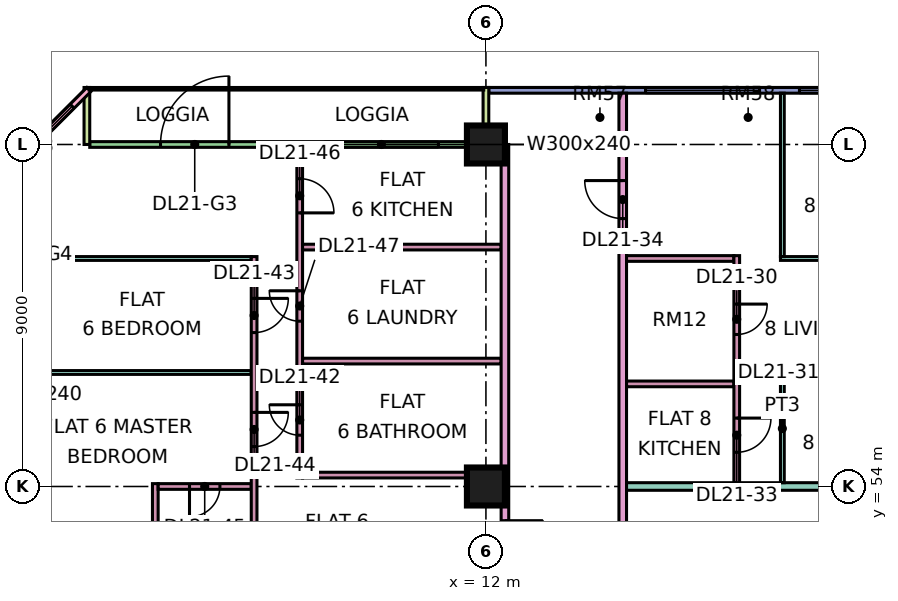
"""IFC4 building model, lengths in metres.
Left out: names, types, materials, properties, quantities, classifications, styles, units other than length and angle.
Written with IfcOpenShell. Run it as: python <this file> out.ifc"""

import sys

from ifc_helpers import new_model, si_unit, direction, frame, frame_2d, origin, origin_2d, place, context, subcontext, project, spatial, rectangle, extrude, element, fill, save


model = new_model("IFC4")
c1 = context("Model", 3, precision=1e-05, world=origin(), true_north=direction((0.0, 1.0)))
c2 = subcontext(c1, "Body", "Model", "MODEL_VIEW")
j1 = project(units=[si_unit("LENGTHUNIT", "METRE"), si_unit("PLANEANGLEUNIT", "RADIAN")], contexts=[c1])
p1 = place(None, origin())
s1 = spatial("IfcSite", under=j1, at=p1, CompositionType="ELEMENT")
p2 = place(p1, origin())
s2 = spatial("IfcBuilding", under=s1, at=p2, CompositionType="ELEMENT")
p3 = place(p2, frame((0.0, 0.0, 95.65)))
s3 = spatial("IfcBuildingStorey", under=s2, at=p3, CompositionType="ELEMENT", Elevation=95.65)
for number, where, z_axis, x_axis in (
    (1, (12.0, 54.0, 0.0), (0.0, 0.0, 1.0), (1.0, 0.0, 0.0)),
    (2, (12.0, 63.0, 0.0), (0.0, 0.0, 1.0), (1.0, 0.0, 0.0)),
):
    element("IfcColumn", number, at=place(p3, frame(where, z_axis=z_axis, x_axis=x_axis)), inside=s3, PredefinedType="COLUMN", context=c2, shape_type="SweptSolid", body=[
        extrude(rectangle(XDim=1.0, YDim=1.0, at=origin_2d()), origin(), (0.0, 0.0, 1.0), 3.75),
    ])
p4 = place(p3, frame((22.5, 64.425, 0.0), z_axis=(0.0, 0.0, 1.0), x_axis=(-1.0, 0.0, 0.0)))
e3 = element("IfcWall", 3, at=p4, inside=s3, PredefinedType="SOLIDWALL", context=c2, shape_type="SweptSolid", body=[
    extrude(rectangle(XDim=10.425, YDim=0.15, at=frame_2d((5.212, 0.0))), origin(), (0.0, 0.0, 1.0), 3.35),
])
p5 = place(p4, frame((0.45, 0.0, 0.45)))
e4 = element("IfcOpeningElement", 4, at=p5, cuts=e3, PredefinedType="OPENING", context=c2, shape_type="SweptSolid", body=[
    extrude(rectangle(XDim=1.8, YDim=2.4, at=frame_2d((0.9, 1.2))), frame((0.0, 0.085, 0.0), z_axis=(0.0, -1.0, 0.0), x_axis=(1.0, 0.0, 0.0)), (0.0, 0.0, 1.0), 0.17),
])
p6 = place(p4, frame((3.3, 0.0, 0.45)))
e5 = element("IfcOpeningElement", 5, at=p6, cuts=e3, PredefinedType="OPENING", context=c2, shape_type="SweptSolid", body=[
    extrude(rectangle(XDim=3.0, YDim=2.4, at=frame_2d((1.5, 1.2))), frame((0.0, 0.085, 0.0), z_axis=(0.0, -1.0, 0.0), x_axis=(1.0, 0.0, 0.0)), (0.0, 0.0, 1.0), 0.17),
])
p7 = place(p3, frame((11.925, 63.0, 0.0), z_axis=(0.0, 0.0, 1.0), x_axis=(-1.0, 0.0, 0.0)))
e6 = element("IfcWall", 6, at=p7, inside=s3, PredefinedType="SOLIDWALL", context=c2, shape_type="SweptSolid", body=[
    extrude(rectangle(XDim=10.35, YDim=0.15, at=frame_2d((5.175, 0.0))), origin(), (0.0, 0.0, 1.0), 3.35),
])
p8 = place(p7, frame((1.175, 0.0, 0.45)))
e7 = element("IfcOpeningElement", 7, at=p8, cuts=e6, PredefinedType="OPENING", context=c2, shape_type="SweptSolid", body=[
    extrude(rectangle(XDim=3.0, YDim=2.4, at=frame_2d((1.5, 1.2))), frame((0.0, 0.085, 0.0), z_axis=(0.0, -1.0, 0.0), x_axis=(1.0, 0.0, 0.0)), (0.0, 0.0, 1.0), 0.17),
])
p9 = place(p7, frame((6.688, 0.0, 0.0)))
e8 = element("IfcOpeningElement", 8, at=p9, cuts=e6, PredefinedType="OPENING", context=c2, shape_type="SweptSolid", body=[
    extrude(rectangle(XDim=1.8, YDim=2.4, at=frame_2d((0.9, 1.2))), frame((0.0, 0.085, 0.0), z_axis=(0.0, -1.0, 0.0), x_axis=(1.0, 0.0, 0.0)), (0.0, 0.0, 1.0), 0.17),
])
for number, where, z_axis, x_axis in (
    (9, (12.0, 64.5, 0.0), (0.0, 0.0, 1.0), (0.0, -1.0, 0.0)),
    (10, (1.5, 64.5, 0.0), (0.0, 0.0, 1.0), (0.0, -1.0, 0.0)),
):
    element("IfcWall", number, at=place(p3, frame(where, z_axis=z_axis, x_axis=x_axis)), inside=s3, PredefinedType="SOLIDWALL", context=c2, shape_type="SweptSolid", body=[
        extrude(rectangle(XDim=1.5, YDim=0.15, at=frame_2d((0.75, 0.0))), origin(), (0.0, 0.0, 1.0), 3.35),
    ])
p10 = place(p3, frame((1.553, 64.447, 0.0), z_axis=(0.0, 0.0, 1.0), x_axis=(-0.707106781187, -0.707106781187, 0.0)))
e11 = element("IfcWall", 11, at=p10, inside=s3, PredefinedType="SOLIDWALL", context=c2, shape_type="SweptSolid", body=[
    extrude(rectangle(XDim=4.243, YDim=0.15, at=frame_2d((2.121, 0.0))), origin(), (0.0, 0.0, 1.0), 3.35),
])
p11 = place(p10, frame((0.621, 0.0, 0.45)))
e12 = element("IfcOpeningElement", 12, at=p11, cuts=e11, PredefinedType="OPENING", context=c2, shape_type="SweptSolid", body=[
    extrude(rectangle(XDim=3.0, YDim=2.4, at=frame_2d((1.5, 1.2))), frame((0.0, 0.085, 0.0), z_axis=(0.0, -1.0, 0.0), x_axis=(1.0, 0.0, 0.0)), (0.0, 0.0, 1.0), 0.17),
])
for number, where, z_axis, x_axis in (
    (13, (0.074, 57.0, 0.0), (0.0, 0.0, 1.0), (1.0, 0.0, 0.0)),
    (14, (0.074, 60.0, 0.0), (0.0, 0.0, 1.0), (1.0, 0.0, 0.0)),
):
    element("IfcWall", number, at=place(p3, frame(where, z_axis=z_axis, x_axis=x_axis)), inside=s3, PredefinedType="PARTITIONING", context=c2, shape_type="SweptSolid", body=[
        extrude(rectangle(XDim=5.751, YDim=0.1, at=frame_2d((2.875, 0.0))), origin(), (0.0, 0.0, 1.0), 3.35),
    ])
p12 = place(p3, frame((3.3, 51.1, 0.0), z_axis=(0.0, 0.0, 1.0), x_axis=(0.0, 1.0, 0.0)))
e15 = element("IfcWall", 15, at=p12, inside=s3, PredefinedType="PARTITIONING", context=c2, shape_type="SweptSolid", body=[
    extrude(rectangle(XDim=2.975, YDim=0.15, at=frame_2d((1.487, 0.0))), origin(), (0.0, 0.0, 1.0), 3.35),
])
p13 = place(p3, frame((3.375, 54.0, 0.0), z_axis=(0.0, 0.0, 1.0), x_axis=(1.0, 0.0, 0.0)))
e16 = element("IfcWall", 16, at=p13, inside=s3, PredefinedType="PARTITIONING", context=c2, shape_type="SweptSolid", body=[
    extrude(rectangle(XDim=2.45, YDim=0.15, at=frame_2d((1.225, 0.0))), origin(), (0.0, 0.0, 1.0), 3.35),
])
p14 = place(p13, frame((0.825, 0.0, 0.0)))
e17 = element("IfcOpeningElement", 17, at=p14, cuts=e16, PredefinedType="OPENING", context=c2, shape_type="SweptSolid", body=[
    extrude(rectangle(XDim=0.8, YDim=2.1, at=frame_2d((0.4, 1.05))), frame((0.0, 0.085, 0.0), z_axis=(0.0, -1.0, 0.0), x_axis=(1.0, 0.0, 0.0)), (0.0, 0.0, 1.0), 0.17),
])
p15 = place(p3, frame((5.9, 51.1, 0.0), z_axis=(0.0, 0.0, 1.0), x_axis=(0.0, 1.0, 0.0)))
e18 = element("IfcWall", 18, at=p15, inside=s3, PredefinedType="PARTITIONING", context=c2, shape_type="SweptSolid", body=[
    extrude(rectangle(XDim=8.95, YDim=0.15, at=frame_2d((4.475, 0.0))), origin(), (0.0, 0.0, 1.0), 3.35),
])
p16 = place(p15, frame((6.95, 0.0, 0.0)))
e19 = element("IfcOpeningElement", 19, at=p16, cuts=e18, PredefinedType="OPENING", context=c2, shape_type="SweptSolid", body=[
    extrude(rectangle(XDim=0.9, YDim=2.1, at=frame_2d((0.45, 1.05))), frame((0.0, 0.085, 0.0), z_axis=(0.0, -1.0, 0.0), x_axis=(1.0, 0.0, 0.0)), (0.0, 0.0, 1.0), 0.17),
])
p17 = place(p15, frame((3.95, 0.0, 0.0)))
e20 = element("IfcOpeningElement", 20, at=p17, cuts=e18, PredefinedType="OPENING", context=c2, shape_type="SweptSolid", body=[
    extrude(rectangle(XDim=0.9, YDim=2.1, at=frame_2d((0.45, 1.05))), frame((0.0, 0.085, 0.0), z_axis=(0.0, -1.0, 0.0), x_axis=(1.0, 0.0, 0.0)), (0.0, 0.0, 1.0), 0.17),
])
p18 = place(p3, frame((7.1, 54.225, 0.0), z_axis=(0.0, 0.0, 1.0), x_axis=(0.0, 1.0, 0.0)))
e21 = element("IfcWall", 21, at=p18, inside=s3, PredefinedType="PARTITIONING", context=c2, shape_type="SweptSolid", body=[
    extrude(rectangle(XDim=8.701, YDim=0.15, at=frame_2d((4.351, 0.0))), origin(), (0.0, 0.0, 1.0), 3.35),
])
p19 = place(p18, frame((1.125, 0.0, 0.0)))
e22 = element("IfcOpeningElement", 22, at=p19, cuts=e21, PredefinedType="OPENING", context=c2, shape_type="SweptSolid", body=[
    extrude(rectangle(XDim=0.8, YDim=2.1, at=frame_2d((0.4, 1.05))), frame((0.0, 0.085, 0.0), z_axis=(0.0, -1.0, 0.0), x_axis=(1.0, 0.0, 0.0)), (0.0, 0.0, 1.0), 0.17),
])
p20 = place(p18, frame((6.975, 0.0, 0.0)))
e23 = element("IfcOpeningElement", 23, at=p20, cuts=e21, PredefinedType="OPENING", context=c2, shape_type="SweptSolid", body=[
    extrude(rectangle(XDim=0.9, YDim=2.1, at=frame_2d((0.45, 1.05))), frame((0.0, 0.085, 0.0), z_axis=(0.0, -1.0, 0.0), x_axis=(1.0, 0.0, 0.0)), (0.0, 0.0, 1.0), 0.17),
])
p21 = place(p18, frame((4.125, 0.0, 0.0)))
e24 = element("IfcOpeningElement", 24, at=p21, cuts=e21, PredefinedType="OPENING", context=c2, shape_type="SweptSolid", body=[
    extrude(rectangle(XDim=0.8, YDim=2.1, at=frame_2d((0.4, 1.05))), frame((0.0, 0.085, 0.0), z_axis=(0.0, -1.0, 0.0), x_axis=(1.0, 0.0, 0.0)), (0.0, 0.0, 1.0), 0.17),
])
for number, where, z_axis, x_axis in (
    (25, (7.175, 54.3, 0.0), (0.0, 0.0, 1.0), (1.0, 0.0, 0.0)),
    (26, (7.175, 57.3, 0.0), (0.0, 0.0, 1.0), (1.0, 0.0, 0.0)),
    (27, (7.175, 60.3, 0.0), (0.0, 0.0, 1.0), (1.0, 0.0, 0.0)),
):
    element("IfcWall", number, at=place(p3, frame(where, z_axis=z_axis, x_axis=x_axis)), inside=s3, PredefinedType="PARTITIONING", context=c2, shape_type="SweptSolid", body=[
        extrude(rectangle(XDim=5.225, YDim=0.15, at=frame_2d((2.612, 0.0))), origin(), (0.0, 0.0, 1.0), 3.35),
    ])
p22 = place(p3, frame((12.5, 20.0, 0.0), z_axis=(0.0, 0.0, 1.0), x_axis=(0.0, 1.0, 0.0)))
e28 = element("IfcWall", 28, at=p22, inside=s3, PredefinedType="PARTITIONING", context=c2, shape_type="SweptSolid", body=[
    extrude(rectangle(XDim=43.0, YDim=0.2, at=frame_2d((21.5, 0.0))), origin(), (0.0, 0.0, 1.0), 3.35),
])
p23 = place(p22, frame((28.65, 0.0, 0.0)))
e29 = element("IfcOpeningElement", 29, at=p23, cuts=e28, PredefinedType="OPENING", context=c2, shape_type="SweptSolid", body=[
    extrude(rectangle(XDim=1.0, YDim=2.1, at=frame_2d((0.5, 1.05))), frame((0.0, 0.11, 0.0), z_axis=(0.0, -1.0, 0.0), x_axis=(1.0, 0.0, 0.0)), (0.0, 0.0, 1.0), 0.22),
])
p24 = place(p22, frame((32.1, 0.0, 0.0)))
e30 = element("IfcOpeningElement", 30, at=p24, cuts=e28, PredefinedType="OPENING", context=c2, shape_type="SweptSolid", body=[
    extrude(rectangle(XDim=1.0, YDim=2.1, at=frame_2d((0.5, 1.05))), frame((0.0, 0.11, 0.0), z_axis=(0.0, -1.0, 0.0), x_axis=(1.0, 0.0, 0.0)), (0.0, 0.0, 1.0), 0.22),
])
p25 = place(p22, frame((0.6, 0.0, 0.0)))
e31 = element("IfcOpeningElement", 31, at=p25, cuts=e28, PredefinedType="OPENING", context=c2, shape_type="SweptSolid", body=[
    extrude(rectangle(XDim=1.2, YDim=2.1, at=frame_2d((0.6, 1.05))), frame((0.0, 0.11, 0.0), z_axis=(0.0, -1.0, 0.0), x_axis=(1.0, 0.0, 0.0)), (0.0, 0.0, 1.0), 0.22),
])
p26 = place(p22, frame((11.1, 0.0, 0.0)))
e32 = element("IfcOpeningElement", 32, at=p26, cuts=e28, PredefinedType="OPENING", context=c2, shape_type="SweptSolid", body=[
    extrude(rectangle(XDim=1.0, YDim=2.1, at=frame_2d((0.5, 1.05))), frame((0.0, 0.11, 0.0), z_axis=(0.0, -1.0, 0.0), x_axis=(1.0, 0.0, 0.0)), (0.0, 0.0, 1.0), 0.22),
])
p27 = place(p3, frame((15.6, 51.225, 0.0), z_axis=(0.0, 0.0, 1.0), x_axis=(0.0, 1.0, 0.0)))
e33 = element("IfcWall", 33, at=p27, inside=s3, PredefinedType="PARTITIONING", context=c2, shape_type="SweptSolid", body=[
    extrude(rectangle(XDim=13.125, YDim=0.2, at=frame_2d((6.562, 0.0))), origin(), (0.0, 0.0, 1.0), 3.35),
])
p28 = place(p27, frame((9.825, 0.0, 0.0)))
e34 = element("IfcOpeningElement", 34, at=p28, cuts=e33, PredefinedType="OPENING", context=c2, shape_type="SweptSolid", body=[
    extrude(rectangle(XDim=1.0, YDim=2.1, at=frame_2d((0.5, 1.05))), frame((0.0, 0.11, 0.0), z_axis=(0.0, -1.0, 0.0), x_axis=(1.0, 0.0, 0.0)), (0.0, 0.0, 1.0), 0.22),
])
p29 = place(p3, frame((15.7, 54.0, 0.0), z_axis=(0.0, 0.0, 1.0), x_axis=(1.0, 0.0, 0.0)))
e35 = element("IfcWall", 35, at=p29, inside=s3, PredefinedType="PARTITIONING", context=c2, shape_type="SweptSolid", body=[
    extrude(rectangle(XDim=8.226, YDim=0.2, at=frame_2d((4.113, 0.0))), origin(), (0.0, 0.0, 1.0), 3.35),
])
for number, where, z_axis, x_axis in (
    (36, (15.7, 56.7, 0.0), (0.0, 0.0, 1.0), (1.0, 0.0, 0.0)),
    (37, (15.7, 60.0, 0.0), (0.0, 0.0, 1.0), (1.0, 0.0, 0.0)),
):
    element("IfcWall", number, at=place(p3, frame(where, z_axis=z_axis, x_axis=x_axis)), inside=s3, PredefinedType="PARTITIONING", context=c2, shape_type="SweptSolid", body=[
        extrude(rectangle(XDim=2.825, YDim=0.15, at=frame_2d((1.413, 0.0))), origin(), (0.0, 0.0, 1.0), 3.35),
    ])
p30 = place(p3, frame((18.6, 54.1, 0.0), z_axis=(0.0, 0.0, 1.0), x_axis=(0.0, 1.0, 0.0)))
e38 = element("IfcWall", 38, at=p30, inside=s3, PredefinedType="PARTITIONING", context=c2, shape_type="SweptSolid", body=[
    extrude(rectangle(XDim=5.975, YDim=0.15, at=frame_2d((2.987, 0.0))), origin(), (0.0, 0.0, 1.0), 3.35),
])
p31 = place(p30, frame((3.9, 0.0, 0.0)))
e39 = element("IfcOpeningElement", 39, at=p31, cuts=e38, PredefinedType="OPENING", context=c2, shape_type="SweptSolid", body=[
    extrude(rectangle(XDim=0.8, YDim=2.1, at=frame_2d((0.4, 1.05))), frame((0.0, 0.085, 0.0), z_axis=(0.0, -1.0, 0.0), x_axis=(1.0, 0.0, 0.0)), (0.0, 0.0, 1.0), 0.17),
])
p32 = place(p30, frame((0.8, 0.0, 0.0)))
e40 = element("IfcOpeningElement", 40, at=p32, cuts=e38, PredefinedType="OPENING", context=c2, shape_type="SweptSolid", body=[
    extrude(rectangle(XDim=0.9, YDim=2.1, at=frame_2d((0.45, 1.05))), frame((0.0, 0.085, 0.0), z_axis=(0.0, -1.0, 0.0), x_axis=(1.0, 0.0, 0.0)), (0.0, 0.0, 1.0), 0.17),
])
p33 = place(p3, frame((19.75, 57.0, 0.0), z_axis=(0.0, 0.0, 1.0), x_axis=(1.0, 0.0, 0.0)))
e41 = element("IfcWall", 41, at=p33, inside=s3, PredefinedType="PARTITIONING", context=c2, shape_type="SweptSolid", body=[
    extrude(rectangle(XDim=4.176, YDim=0.1, at=frame_2d((2.088, 0.0))), origin(), (0.0, 0.0, 1.0), 3.35),
])
p34 = place(p33, frame((1.7, 0.0, 0.0)))
e42 = element("IfcOpeningElement", 42, at=p34, cuts=e41, PredefinedType="OPENING", context=c2, shape_type="SweptSolid", body=[
    extrude(rectangle(XDim=0.9, YDim=2.1, at=frame_2d((0.45, 1.05))), frame((0.0, 0.06, 0.0), z_axis=(0.0, -1.0, 0.0), x_axis=(1.0, 0.0, 0.0)), (0.0, 0.0, 1.0), 0.12),
])
p35 = place(p3, frame((19.75, 60.0, 0.0), z_axis=(0.0, 0.0, 1.0), x_axis=(1.0, 0.0, 0.0)))
e43 = element("IfcWall", 43, at=p35, inside=s3, PredefinedType="PARTITIONING", context=c2, shape_type="SweptSolid", body=[
    extrude(rectangle(XDim=4.176, YDim=0.1, at=frame_2d((2.088, 0.0))), origin(), (0.0, 0.0, 1.0), 3.35),
])
p36 = place(p35, frame((1.7, 0.0, 0.0)))
e44 = element("IfcOpeningElement", 44, at=p36, cuts=e43, PredefinedType="OPENING", context=c2, shape_type="SweptSolid", body=[
    extrude(rectangle(XDim=0.9, YDim=2.1, at=frame_2d((0.45, 1.05))), frame((0.0, 0.06, 0.0), z_axis=(0.0, -1.0, 0.0), x_axis=(1.0, 0.0, 0.0)), (0.0, 0.0, 1.0), 0.12),
])
p37 = place(p3, frame((19.8, 54.1, 0.0), z_axis=(0.0, 0.0, 1.0), x_axis=(0.0, 1.0, 0.0)))
e45 = element("IfcWall", 45, at=p37, inside=s3, PredefinedType="PARTITIONING", context=c2, shape_type="SweptSolid", body=[
    extrude(rectangle(XDim=2.85, YDim=0.1, at=frame_2d((1.425, 0.0))), origin(), (0.0, 0.0, 1.0), 3.35),
])
p38 = place(p3, frame((19.8, 60.05, 0.0), z_axis=(0.0, 0.0, 1.0), x_axis=(0.0, 1.0, 0.0)))
e46 = element("IfcWall", 46, at=p38, inside=s3, PredefinedType="PARTITIONING", context=c2, shape_type="SweptSolid", body=[
    extrude(rectangle(XDim=4.3, YDim=0.1, at=frame_2d((2.15, 0.0))), origin(), (0.0, 0.0, 1.0), 3.35),
])
p39 = place(p5, origin())
e47 = element("IfcWindow", 47, at=p39, inside=s3, PartitioningType="SINGLE_PANEL", PredefinedType="WINDOW", context=c2, shape_type="SweptSolid", body=[
    extrude(rectangle(XDim=1.8, YDim=2.4, at=frame_2d((0.9, 1.2))), frame((0.0, 0.03, 0.0), z_axis=(0.0, -1.0, 0.0), x_axis=(1.0, 0.0, 0.0)), (0.0, 0.0, 1.0), 0.06),
])
fill(e4, e47)
p40 = place(p6, origin())
e48 = element("IfcWindow", 48, at=p40, inside=s3, PartitioningType="SINGLE_PANEL", PredefinedType="WINDOW", context=c2, shape_type="SweptSolid", body=[
    extrude(rectangle(XDim=3.0, YDim=2.4, at=frame_2d((1.5, 1.2))), frame((0.0, 0.03, 0.0), z_axis=(0.0, -1.0, 0.0), x_axis=(1.0, 0.0, 0.0)), (0.0, 0.0, 1.0), 0.06),
])
fill(e5, e48)
p41 = place(p8, origin())
e49 = element("IfcWindow", 49, at=p41, inside=s3, PartitioningType="SINGLE_PANEL", PredefinedType="WINDOW", context=c2, shape_type="SweptSolid", body=[
    extrude(rectangle(XDim=3.0, YDim=2.4, at=frame_2d((1.5, 1.2))), frame((0.0, 0.03, 0.0), z_axis=(0.0, -1.0, 0.0), x_axis=(1.0, 0.0, 0.0)), (0.0, 0.0, 1.0), 0.06),
])
fill(e7, e49)
p42 = place(p9, frame((1.8, 0.0, 0.0), z_axis=(0.0, 0.0, 1.0), x_axis=(-1.0, 0.0, 0.0)))
e50 = element("IfcDoor", 50, at=p42, inside=s3, OperationType="DOUBLE_DOOR_SINGLE_SWING", PredefinedType="DOOR", context=c2, shape_type="SweptSolid", body=[
    extrude(rectangle(XDim=1.8, YDim=2.4, at=frame_2d((0.9, 1.2))), frame((0.0, 0.025, 0.0), z_axis=(0.0, -1.0, 0.0), x_axis=(1.0, 0.0, 0.0)), (0.0, 0.0, 1.0), 0.05),
])
fill(e8, e50)
p43 = place(p11, origin())
e51 = element("IfcWindow", 51, at=p43, inside=s3, PartitioningType="SINGLE_PANEL", PredefinedType="WINDOW", context=c2, shape_type="SweptSolid", body=[
    extrude(rectangle(XDim=3.0, YDim=2.4, at=frame_2d((1.5, 1.2))), frame((0.0, 0.03, 0.0), z_axis=(0.0, -1.0, 0.0), x_axis=(1.0, 0.0, 0.0)), (0.0, 0.0, 1.0), 0.06),
])
fill(e12, e51)
p44 = place(p31, origin())
e52 = element("IfcDoor", 52, at=p44, inside=s3, OperationType="SINGLE_SWING_RIGHT", PredefinedType="DOOR", context=c2, shape_type="SweptSolid", body=[
    extrude(rectangle(XDim=0.8, YDim=2.1, at=frame_2d((0.4, 1.05))), frame((0.0, 0.025, 0.0), z_axis=(0.0, -1.0, 0.0), x_axis=(1.0, 0.0, 0.0)), (0.0, 0.0, 1.0), 0.05),
])
fill(e39, e52)
p45 = place(p32, origin())
e53 = element("IfcDoor", 53, at=p45, inside=s3, OperationType="SINGLE_SWING_RIGHT", PredefinedType="DOOR", context=c2, shape_type="SweptSolid", body=[
    extrude(rectangle(XDim=0.9, YDim=2.1, at=frame_2d((0.45, 1.05))), frame((0.0, 0.025, 0.0), z_axis=(0.0, -1.0, 0.0), x_axis=(1.0, 0.0, 0.0)), (0.0, 0.0, 1.0), 0.05),
])
fill(e40, e53)
p46 = place(p28, frame((1.0, 0.0, 0.0), z_axis=(0.0, 0.0, 1.0), x_axis=(-1.0, 0.0, 0.0)))
e54 = element("IfcDoor", 54, at=p46, inside=s3, OperationType="SINGLE_SWING_RIGHT", PredefinedType="DOOR", context=c2, shape_type="SweptSolid", body=[
    extrude(rectangle(XDim=1.0, YDim=2.1, at=frame_2d((0.5, 1.05))), frame((0.0, 0.025, 0.0), z_axis=(0.0, -1.0, 0.0), x_axis=(1.0, 0.0, 0.0)), (0.0, 0.0, 1.0), 0.05),
])
fill(e34, e54)
p47 = place(p19, frame((0.8, 0.0, 0.0), z_axis=(0.0, 0.0, 1.0), x_axis=(-1.0, 0.0, 0.0)))
e55 = element("IfcDoor", 55, at=p47, inside=s3, OperationType="SINGLE_SWING_RIGHT", PredefinedType="DOOR", context=c2, shape_type="SweptSolid", body=[
    extrude(rectangle(XDim=0.8, YDim=2.1, at=frame_2d((0.4, 1.05))), frame((0.0, 0.025, 0.0), z_axis=(0.0, -1.0, 0.0), x_axis=(1.0, 0.0, 0.0)), (0.0, 0.0, 1.0), 0.05),
])
fill(e22, e55)
p48 = place(p16, origin())
e56 = element("IfcDoor", 56, at=p48, inside=s3, OperationType="SINGLE_SWING_RIGHT", PredefinedType="DOOR", context=c2, shape_type="SweptSolid", body=[
    extrude(rectangle(XDim=0.9, YDim=2.1, at=frame_2d((0.45, 1.05))), frame((0.0, 0.025, 0.0), z_axis=(0.0, -1.0, 0.0), x_axis=(1.0, 0.0, 0.0)), (0.0, 0.0, 1.0), 0.05),
])
fill(e19, e56)
p49 = place(p17, origin())
e57 = element("IfcDoor", 57, at=p49, inside=s3, OperationType="SINGLE_SWING_RIGHT", PredefinedType="DOOR", context=c2, shape_type="SweptSolid", body=[
    extrude(rectangle(XDim=0.9, YDim=2.1, at=frame_2d((0.45, 1.05))), frame((0.0, 0.025, 0.0), z_axis=(0.0, -1.0, 0.0), x_axis=(1.0, 0.0, 0.0)), (0.0, 0.0, 1.0), 0.05),
])
fill(e20, e57)
p50 = place(p14, frame((0.8, 0.0, 0.0), z_axis=(0.0, 0.0, 1.0), x_axis=(-1.0, 0.0, 0.0)))
e58 = element("IfcDoor", 58, at=p50, inside=s3, OperationType="SINGLE_SWING_LEFT", PredefinedType="DOOR", context=c2, shape_type="SweptSolid", body=[
    extrude(rectangle(XDim=0.8, YDim=2.1, at=frame_2d((0.4, 1.05))), frame((0.0, 0.025, 0.0), z_axis=(0.0, -1.0, 0.0), x_axis=(1.0, 0.0, 0.0)), (0.0, 0.0, 1.0), 0.05),
])
fill(e17, e58)
p51 = place(p20, frame((0.9, 0.0, 0.0), z_axis=(0.0, 0.0, 1.0), x_axis=(-1.0, 0.0, 0.0)))
e59 = element("IfcDoor", 59, at=p51, inside=s3, OperationType="SINGLE_SWING_LEFT", PredefinedType="DOOR", context=c2, shape_type="SweptSolid", body=[
    extrude(rectangle(XDim=0.9, YDim=2.1, at=frame_2d((0.45, 1.05))), frame((0.0, 0.025, 0.0), z_axis=(0.0, -1.0, 0.0), x_axis=(1.0, 0.0, 0.0)), (0.0, 0.0, 1.0), 0.05),
])
fill(e23, e59)
p52 = place(p21, frame((0.8, 0.0, 0.0), z_axis=(0.0, 0.0, 1.0), x_axis=(-1.0, 0.0, 0.0)))
e60 = element("IfcDoor", 60, at=p52, inside=s3, OperationType="SINGLE_SWING_RIGHT", PredefinedType="DOOR", context=c2, shape_type="SweptSolid", body=[
    extrude(rectangle(XDim=0.8, YDim=2.1, at=frame_2d((0.4, 1.05))), frame((0.0, 0.025, 0.0), z_axis=(0.0, -1.0, 0.0), x_axis=(1.0, 0.0, 0.0)), (0.0, 0.0, 1.0), 0.05),
])
fill(e24, e60)
p53 = place(p24, origin())
e61 = element("IfcDoor", 61, at=p53, inside=s3, OperationType="SINGLE_SWING_RIGHT", PredefinedType="DOOR", context=c2, shape_type="SweptSolid", body=[
    extrude(rectangle(XDim=1.0, YDim=2.1, at=frame_2d((0.5, 1.05))), frame((0.0, 0.025, 0.0), z_axis=(0.0, -1.0, 0.0), x_axis=(1.0, 0.0, 0.0)), (0.0, 0.0, 1.0), 0.05),
])
fill(e30, e61)
save(model, sys.argv[1])
